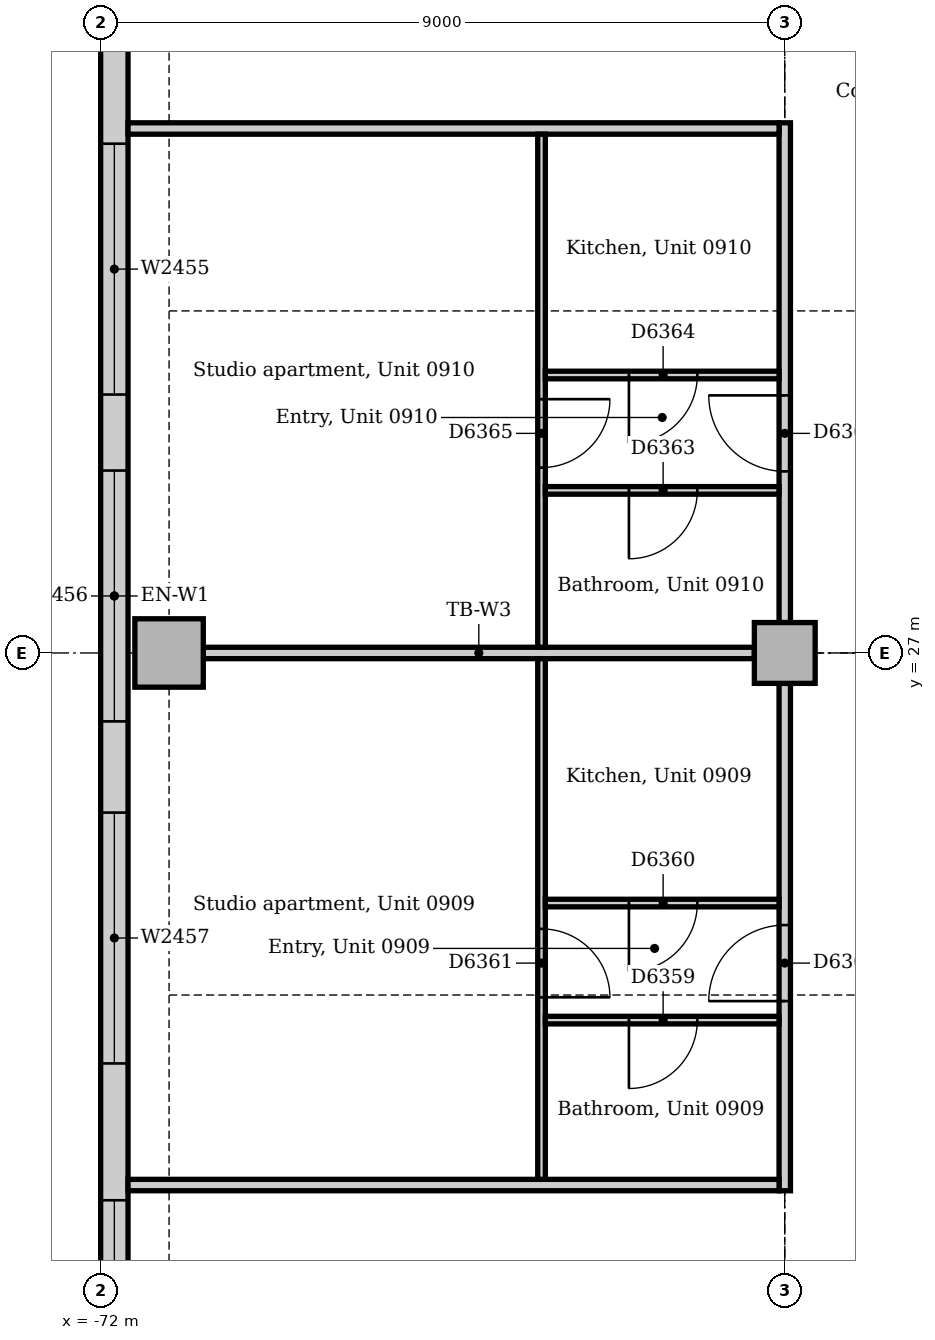
"""IFC4 building model, lengths in metres.
Left out: names, types, materials, properties, quantities, classifications, styles, units other than length and angle.
Written with IfcOpenShell. Run it as: python <this file> out.ifc"""

import sys

from ifc_helpers import new_model, si_unit, direction, frame, frame_2d, origin, origin_2d, place, context, subcontext, project, spatial, rectangle, extrude, element, fill, save


model = new_model("IFC4")
c1 = context("Model", 3, precision=1e-05, world=origin(), true_north=direction((0.0, 1.0)))
c2 = subcontext(c1, "Body", "Model", "MODEL_VIEW")
j1 = project(units=[si_unit("LENGTHUNIT", "METRE"), si_unit("PLANEANGLEUNIT", "RADIAN")], contexts=[c1])
p1 = place(None, origin())
s1 = spatial("IfcSite", under=j1, at=p1, CompositionType="ELEMENT")
p2 = place(p1, origin())
s2 = spatial("IfcBuilding", under=s1, at=p2, CompositionType="ELEMENT")
p3 = place(p2, frame((0.0, 0.0, 42.0)))
s3 = spatial("IfcBuildingStorey", under=s2, at=p3, CompositionType="ELEMENT", Elevation=42.0)
p4 = place(p3, frame((-71.1, 27.0, 0.0), z_axis=(0.0, 0.0, 1.0), x_axis=(1.0, 0.0, 0.0)))
e1 = element("IfcColumn", 1, at=p4, inside=s3, PredefinedType="COLUMN", context=c2, shape_type="SweptSolid", body=[
    extrude(rectangle(XDim=0.9, YDim=0.9, at=origin_2d()), origin(), (0.0, 0.0, 1.0), 3.7),
])
p5 = place(p3, frame((-63.0, 27.0, 0.0), z_axis=(0.0, 0.0, 1.0), x_axis=(1.0, 0.0, 0.0)))
e2 = element("IfcColumn", 2, at=p5, inside=s3, PredefinedType="COLUMN", context=c2, shape_type="SweptSolid", body=[
    extrude(rectangle(XDim=0.8, YDim=0.8, at=origin_2d()), origin(), (0.0, 0.0, 1.0), 3.7),
])
p6 = place(p3, frame((-71.82, 40.757, 0.0), z_axis=(0.0, 0.0, 1.0), x_axis=(0.0, -1.0, 0.0)))
e3 = element("IfcWall", 3, at=p6, inside=s3, PredefinedType="STANDARD", context=c2, shape_type="SweptSolid", body=[
    extrude(rectangle(XDim=26.015, YDim=0.36, at=frame_2d((13.007, 0.0))), origin(), (0.0, 0.0, 1.0), 3.7),
])
p7 = place(p6, frame((2.357, 0.0, 0.9)))
e4 = element("IfcOpeningElement", 4, at=p7, cuts=e3, PredefinedType="OPENING", context=c2, shape_type="SweptSolid", body=[
    extrude(rectangle(XDim=3.3, YDim=1.6, at=frame_2d((1.65, 0.8))), frame((0.0, 0.19, 0.0), z_axis=(0.0, -1.0, 0.0), x_axis=(1.0, 0.0, 0.0)), (0.0, 0.0, 1.0), 0.38),
])
p8 = place(p6, frame((7.057, 0.0, 0.9)))
e5 = element("IfcOpeningElement", 5, at=p8, cuts=e3, PredefinedType="OPENING", context=c2, shape_type="SweptSolid", body=[
    extrude(rectangle(XDim=3.3, YDim=1.6, at=frame_2d((1.65, 0.8))), frame((0.0, 0.19, 0.0), z_axis=(0.0, -1.0, 0.0), x_axis=(1.0, 0.0, 0.0)), (0.0, 0.0, 1.0), 0.38),
])
p9 = place(p6, frame((11.357, 0.0, 0.9)))
e6 = element("IfcOpeningElement", 6, at=p9, cuts=e3, PredefinedType="OPENING", context=c2, shape_type="SweptSolid", body=[
    extrude(rectangle(XDim=3.3, YDim=1.6, at=frame_2d((1.65, 0.8))), frame((0.0, 0.19, 0.0), z_axis=(0.0, -1.0, 0.0), x_axis=(1.0, 0.0, 0.0)), (0.0, 0.0, 1.0), 0.38),
])
p10 = place(p6, frame((15.857, 0.0, 0.9)))
e7 = element("IfcOpeningElement", 7, at=p10, cuts=e3, PredefinedType="OPENING", context=c2, shape_type="SweptSolid", body=[
    extrude(rectangle(XDim=3.3, YDim=1.6, at=frame_2d((1.65, 0.8))), frame((0.0, 0.19, 0.0), z_axis=(0.0, -1.0, 0.0), x_axis=(1.0, 0.0, 0.0)), (0.0, 0.0, 1.0), 0.38),
])
p11 = place(p6, frame((20.957, 0.0, 0.9)))
e8 = element("IfcOpeningElement", 8, at=p11, cuts=e3, PredefinedType="OPENING", context=c2, shape_type="SweptSolid", body=[
    extrude(rectangle(XDim=3.3, YDim=1.6, at=frame_2d((1.65, 0.8))), frame((0.0, 0.19, 0.0), z_axis=(0.0, -1.0, 0.0), x_axis=(1.0, 0.0, 0.0)), (0.0, 0.0, 1.0), 0.38),
])
p12 = place(p3, frame((-63.0, 19.925, 0.0), z_axis=(0.0, 0.0, 1.0), x_axis=(0.0, 1.0, 0.0)))
e9 = element("IfcWall", 9, at=p12, inside=s3, PredefinedType="PARTITIONING", context=c2, shape_type="SweptSolid", body=[
    extrude(rectangle(XDim=6.675, YDim=0.15, at=frame_2d((3.337, 0.0))), origin(), (0.0, 0.0, 1.0), 3.008),
])
p13 = place(p12, frame((2.495, 0.0, 0.0)))
e10 = element("IfcOpeningElement", 10, at=p13, cuts=e9, PredefinedType="OPENING", context=c2, shape_type="SweptSolid", body=[
    extrude(rectangle(XDim=1.0, YDim=2.1, at=frame_2d((0.5, 1.05))), frame((0.0, 0.085, 0.0), z_axis=(0.0, -1.0, 0.0), x_axis=(1.0, 0.0, 0.0)), (0.0, 0.0, 1.0), 0.17),
])
p14 = place(p3, frame((-63.0, 27.4, 0.0), z_axis=(0.0, 0.0, 1.0), x_axis=(0.0, 1.0, 0.0)))
e11 = element("IfcWall", 11, at=p14, inside=s3, PredefinedType="PARTITIONING", context=c2, shape_type="SweptSolid", body=[
    extrude(rectangle(XDim=6.575, YDim=0.15, at=frame_2d((3.288, 0.0))), origin(), (0.0, 0.0, 1.0), 3.008),
])
p15 = place(p14, frame((1.989, 0.0, 0.0)))
e12 = element("IfcOpeningElement", 12, at=p15, cuts=e11, PredefinedType="OPENING", context=c2, shape_type="SweptSolid", body=[
    extrude(rectangle(XDim=1.0, YDim=2.1, at=frame_2d((0.5, 1.05))), frame((0.0, 0.085, 0.0), z_axis=(0.0, -1.0, 0.0), x_axis=(1.0, 0.0, 0.0)), (0.0, 0.0, 1.0), 0.17),
])
for number, where, z_axis, x_axis in (
    (13, (-71.64, 20.0, 0.0), (0.0, 0.0, 1.0), (1.0, 0.0, 0.0)),
    (14, (-71.64, 33.9, 0.0), (0.0, 0.0, 1.0), (1.0, 0.0, 0.0)),
):
    element("IfcWall", number, at=place(p3, frame(where, z_axis=z_axis, x_axis=x_axis)), inside=s3, PredefinedType="PARTITIONING", context=c2, shape_type="SweptSolid", body=[
        extrude(rectangle(XDim=8.565, YDim=0.15, at=frame_2d((4.282, 0.0))), origin(), (0.0, 0.0, 1.0), 3.7),
    ])
p16 = place(p3, frame((-70.65, 27.0, 0.0), z_axis=(0.0, 0.0, 1.0), x_axis=(1.0, 0.0, 0.0)))
e15 = element("IfcWall", 15, at=p16, inside=s3, PredefinedType="PARTITIONING", context=c2, shape_type="SweptSolid", body=[
    extrude(rectangle(XDim=7.25, YDim=0.15, at=frame_2d((3.625, 0.0))), origin(), (0.0, 0.0, 1.0), 3.0),
])
p17 = place(p3, frame((-66.2, 27.075, 0.0), z_axis=(0.0, 0.0, 1.0), x_axis=(0.0, 1.0, 0.0)))
e16 = element("IfcWall", 16, at=p17, inside=s3, PredefinedType="PARTITIONING", context=c2, shape_type="SweptSolid", body=[
    extrude(rectangle(XDim=6.75, YDim=0.1, at=frame_2d((3.375, 0.0))), origin(), (0.0, 0.0, 1.0), 3.7),
])
p18 = place(p17, frame((2.364, 0.0, 0.0)))
e17 = element("IfcOpeningElement", 17, at=p18, cuts=e16, PredefinedType="OPENING", context=c2, shape_type="SweptSolid", body=[
    extrude(rectangle(XDim=0.9, YDim=2.1, at=frame_2d((0.45, 1.05))), frame((0.0, 0.06, 0.0), z_axis=(0.0, -1.0, 0.0), x_axis=(1.0, 0.0, 0.0)), (0.0, 0.0, 1.0), 0.12),
])
p19 = place(p3, frame((-66.2, 20.075, 0.0), z_axis=(0.0, 0.0, 1.0), x_axis=(0.0, 1.0, 0.0)))
e18 = element("IfcWall", 18, at=p19, inside=s3, PredefinedType="PARTITIONING", context=c2, shape_type="SweptSolid", body=[
    extrude(rectangle(XDim=6.85, YDim=0.1, at=frame_2d((3.425, 0.0))), origin(), (0.0, 0.0, 1.0), 3.7),
])
p20 = place(p19, frame((2.395, 0.0, 0.0)))
e19 = element("IfcOpeningElement", 19, at=p20, cuts=e18, PredefinedType="OPENING", context=c2, shape_type="SweptSolid", body=[
    extrude(rectangle(XDim=0.9, YDim=2.1, at=frame_2d((0.45, 1.05))), frame((0.0, 0.06, 0.0), z_axis=(0.0, -1.0, 0.0), x_axis=(1.0, 0.0, 0.0)), (0.0, 0.0, 1.0), 0.12),
])
p21 = place(p3, frame((-66.15, 22.17, 0.0), z_axis=(0.0, 0.0, 1.0), x_axis=(1.0, 0.0, 0.0)))
e20 = element("IfcWall", 20, at=p21, inside=s3, PredefinedType="PARTITIONING", context=c2, shape_type="SweptSolid", body=[
    extrude(rectangle(XDim=3.075, YDim=0.1, at=frame_2d((1.538, 0.0))), origin(), (0.0, 0.0, 1.0), 3.7),
])
p22 = place(p21, frame((1.1, 0.0, 0.0)))
e21 = element("IfcOpeningElement", 21, at=p22, cuts=e20, PredefinedType="OPENING", context=c2, shape_type="SweptSolid", body=[
    extrude(rectangle(XDim=0.9, YDim=2.1, at=frame_2d((0.45, 1.05))), frame((0.0, 0.06, 0.0), z_axis=(0.0, -1.0, 0.0), x_axis=(1.0, 0.0, 0.0)), (0.0, 0.0, 1.0), 0.12),
])
p23 = place(p3, frame((-66.15, 23.71, 0.0), z_axis=(0.0, 0.0, 1.0), x_axis=(1.0, 0.0, 0.0)))
e22 = element("IfcWall", 22, at=p23, inside=s3, PredefinedType="PARTITIONING", context=c2, shape_type="SweptSolid", body=[
    extrude(rectangle(XDim=3.075, YDim=0.1, at=frame_2d((1.538, 0.0))), origin(), (0.0, 0.0, 1.0), 3.7),
])
p24 = place(p23, frame((1.1, 0.0, 0.0)))
e23 = element("IfcOpeningElement", 23, at=p24, cuts=e22, PredefinedType="OPENING", context=c2, shape_type="SweptSolid", body=[
    extrude(rectangle(XDim=0.9, YDim=2.1, at=frame_2d((0.45, 1.05))), frame((0.0, 0.06, 0.0), z_axis=(0.0, -1.0, 0.0), x_axis=(1.0, 0.0, 0.0)), (0.0, 0.0, 1.0), 0.12),
])
p25 = place(p3, frame((-66.15, 29.139, 0.0), z_axis=(0.0, 0.0, 1.0), x_axis=(1.0, 0.0, 0.0)))
e24 = element("IfcWall", 24, at=p25, inside=s3, PredefinedType="PARTITIONING", context=c2, shape_type="SweptSolid", body=[
    extrude(rectangle(XDim=3.075, YDim=0.1, at=frame_2d((1.538, 0.0))), origin(), (0.0, 0.0, 1.0), 3.7),
])
p26 = place(p25, frame((1.1, 0.0, 0.0)))
e25 = element("IfcOpeningElement", 25, at=p26, cuts=e24, PredefinedType="OPENING", context=c2, shape_type="SweptSolid", body=[
    extrude(rectangle(XDim=0.9, YDim=2.1, at=frame_2d((0.45, 1.05))), frame((0.0, 0.06, 0.0), z_axis=(0.0, -1.0, 0.0), x_axis=(1.0, 0.0, 0.0)), (0.0, 0.0, 1.0), 0.12),
])
p27 = place(p3, frame((-66.15, 30.657, 0.0), z_axis=(0.0, 0.0, 1.0), x_axis=(1.0, 0.0, 0.0)))
e26 = element("IfcWall", 26, at=p27, inside=s3, PredefinedType="PARTITIONING", context=c2, shape_type="SweptSolid", body=[
    extrude(rectangle(XDim=3.075, YDim=0.1, at=frame_2d((1.538, 0.0))), origin(), (0.0, 0.0, 1.0), 3.7),
])
p28 = place(p27, frame((1.1, 0.0, 0.0)))
e27 = element("IfcOpeningElement", 27, at=p28, cuts=e26, PredefinedType="OPENING", context=c2, shape_type="SweptSolid", body=[
    extrude(rectangle(XDim=0.9, YDim=2.1, at=frame_2d((0.45, 1.05))), frame((0.0, 0.06, 0.0), z_axis=(0.0, -1.0, 0.0), x_axis=(1.0, 0.0, 0.0)), (0.0, 0.0, 1.0), 0.12),
])
p29 = place(p8, origin())
e28 = element("IfcWindow", 28, at=p29, inside=s3, PartitioningType="SINGLE_PANEL", PredefinedType="WINDOW", context=c2, shape_type="SweptSolid", body=[
    extrude(rectangle(XDim=3.3, YDim=1.6, at=frame_2d((1.65, 0.8))), frame((0.0, 0.13, 0.0), z_axis=(0.0, -1.0, 0.0), x_axis=(1.0, 0.0, 0.0)), (0.0, 0.0, 1.0), 0.06),
])
fill(e5, e28)
p30 = place(p9, origin())
e29 = element("IfcWindow", 29, at=p30, inside=s3, PartitioningType="SINGLE_PANEL", PredefinedType="WINDOW", context=c2, shape_type="SweptSolid", body=[
    extrude(rectangle(XDim=3.3, YDim=1.6, at=frame_2d((1.65, 0.8))), frame((0.0, 0.13, 0.0), z_axis=(0.0, -1.0, 0.0), x_axis=(1.0, 0.0, 0.0)), (0.0, 0.0, 1.0), 0.06),
])
fill(e6, e29)
p31 = place(p10, origin())
e30 = element("IfcWindow", 30, at=p31, inside=s3, PartitioningType="SINGLE_PANEL", PredefinedType="WINDOW", context=c2, shape_type="SweptSolid", body=[
    extrude(rectangle(XDim=3.3, YDim=1.6, at=frame_2d((1.65, 0.8))), frame((0.0, 0.13, 0.0), z_axis=(0.0, -1.0, 0.0), x_axis=(1.0, 0.0, 0.0)), (0.0, 0.0, 1.0), 0.06),
])
fill(e7, e30)
p32 = place(p11, origin())
e31 = element("IfcWindow", 31, at=p32, inside=s3, PartitioningType="SINGLE_PANEL", PredefinedType="WINDOW", context=c2, shape_type="SweptSolid", body=[
    extrude(rectangle(XDim=3.3, YDim=1.6, at=frame_2d((1.65, 0.8))), frame((0.0, 0.13, 0.0), z_axis=(0.0, -1.0, 0.0), x_axis=(1.0, 0.0, 0.0)), (0.0, 0.0, 1.0), 0.06),
])
fill(e8, e31)
p33 = place(p22, frame((0.9, 0.0, 0.0), z_axis=(0.0, 0.0, 1.0), x_axis=(-1.0, 0.0, 0.0)))
e32 = element("IfcDoor", 32, at=p33, inside=s3, OperationType="SINGLE_SWING_RIGHT", PredefinedType="DOOR", context=c2, shape_type="SweptSolid", body=[
    extrude(rectangle(XDim=0.9, YDim=2.1, at=frame_2d((0.45, 1.05))), frame((0.0, 0.025, 0.0), z_axis=(0.0, -1.0, 0.0), x_axis=(1.0, 0.0, 0.0)), (0.0, 0.0, 1.0), 0.05),
])
fill(e21, e32)
p34 = place(p24, frame((0.9, 0.0, 0.0), z_axis=(0.0, 0.0, 1.0), x_axis=(-1.0, 0.0, 0.0)))
e33 = element("IfcDoor", 33, at=p34, inside=s3, OperationType="SINGLE_SWING_RIGHT", PredefinedType="DOOR", context=c2, shape_type="SweptSolid", body=[
    extrude(rectangle(XDim=0.9, YDim=2.1, at=frame_2d((0.45, 1.05))), frame((0.0, 0.025, 0.0), z_axis=(0.0, -1.0, 0.0), x_axis=(1.0, 0.0, 0.0)), (0.0, 0.0, 1.0), 0.05),
])
fill(e23, e33)
p35 = place(p20, frame((0.9, 0.0, 0.0), z_axis=(0.0, 0.0, 1.0), x_axis=(-1.0, 0.0, 0.0)))
e34 = element("IfcDoor", 34, at=p35, inside=s3, OperationType="SINGLE_SWING_RIGHT", PredefinedType="DOOR", context=c2, shape_type="SweptSolid", body=[
    extrude(rectangle(XDim=0.9, YDim=2.1, at=frame_2d((0.45, 1.05))), frame((0.0, 0.025, 0.0), z_axis=(0.0, -1.0, 0.0), x_axis=(1.0, 0.0, 0.0)), (0.0, 0.0, 1.0), 0.05),
])
fill(e19, e34)
p36 = place(p13, origin())
e35 = element("IfcDoor", 35, at=p36, inside=s3, OperationType="SINGLE_SWING_LEFT", PredefinedType="DOOR", context=c2, shape_type="SweptSolid", body=[
    extrude(rectangle(XDim=1.0, YDim=2.1, at=frame_2d((0.5, 1.05))), frame((0.0, 0.025, 0.0), z_axis=(0.0, -1.0, 0.0), x_axis=(1.0, 0.0, 0.0)), (0.0, 0.0, 1.0), 0.05),
])
fill(e10, e35)
p37 = place(p26, frame((0.9, 0.0, 0.0), z_axis=(0.0, 0.0, 1.0), x_axis=(-1.0, 0.0, 0.0)))
e36 = element("IfcDoor", 36, at=p37, inside=s3, OperationType="SINGLE_SWING_RIGHT", PredefinedType="DOOR", context=c2, shape_type="SweptSolid", body=[
    extrude(rectangle(XDim=0.9, YDim=2.1, at=frame_2d((0.45, 1.05))), frame((0.0, 0.025, 0.0), z_axis=(0.0, -1.0, 0.0), x_axis=(1.0, 0.0, 0.0)), (0.0, 0.0, 1.0), 0.05),
])
fill(e25, e36)
p38 = place(p28, frame((0.9, 0.0, 0.0), z_axis=(0.0, 0.0, 1.0), x_axis=(-1.0, 0.0, 0.0)))
e37 = element("IfcDoor", 37, at=p38, inside=s3, OperationType="SINGLE_SWING_RIGHT", PredefinedType="DOOR", context=c2, shape_type="SweptSolid", body=[
    extrude(rectangle(XDim=0.9, YDim=2.1, at=frame_2d((0.45, 1.05))), frame((0.0, 0.025, 0.0), z_axis=(0.0, -1.0, 0.0), x_axis=(1.0, 0.0, 0.0)), (0.0, 0.0, 1.0), 0.05),
])
fill(e27, e37)
p39 = place(p18, frame((0.9, 0.0, 0.0), z_axis=(0.0, 0.0, 1.0), x_axis=(-1.0, 0.0, 0.0)))
e38 = element("IfcDoor", 38, at=p39, inside=s3, OperationType="SINGLE_SWING_LEFT", PredefinedType="DOOR", context=c2, shape_type="SweptSolid", body=[
    extrude(rectangle(XDim=0.9, YDim=2.1, at=frame_2d((0.45, 1.05))), frame((0.0, 0.025, 0.0), z_axis=(0.0, -1.0, 0.0), x_axis=(1.0, 0.0, 0.0)), (0.0, 0.0, 1.0), 0.05),
])
fill(e17, e38)
p40 = place(p15, origin())
e39 = element("IfcDoor", 39, at=p40, inside=s3, OperationType="SINGLE_SWING_RIGHT", PredefinedType="DOOR", context=c2, shape_type="SweptSolid", body=[
    extrude(rectangle(XDim=1.0, YDim=2.1, at=frame_2d((0.5, 1.05))), frame((0.0, 0.025, 0.0), z_axis=(0.0, -1.0, 0.0), x_axis=(1.0, 0.0, 0.0)), (0.0, 0.0, 1.0), 0.05),
])
fill(e12, e39)
save(model, sys.argv[1])
